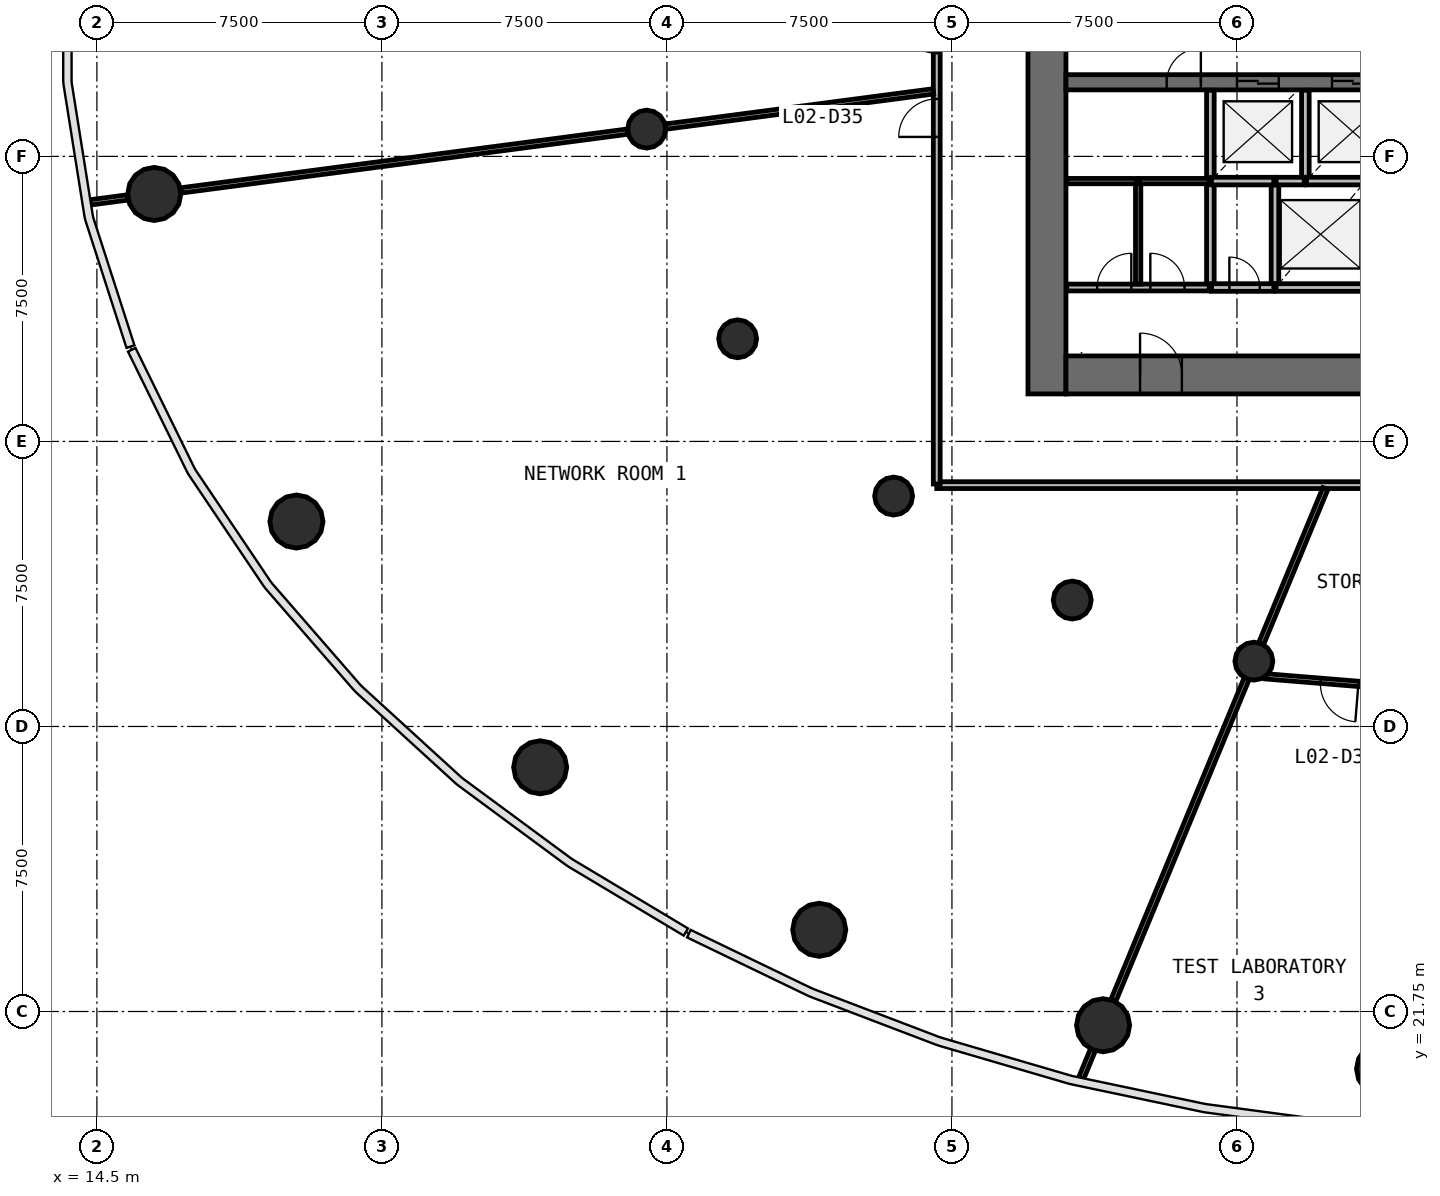
"""IFC4 building model, lengths in metres.
Left out: names, types, materials, properties, quantities, classifications, styles, units other than length and angle.
Written with IfcOpenShell. Run it as: python <this file> out.ifc"""

import sys

from ifc_helpers import new_model, si_unit, direction, frame, frame_2d, origin, origin_2d, place, context, subcontext, project, spatial, rectangle, circle, extrude, source, transform, mapped, element, fill, save


model = new_model("IFC4")
c1 = context("Model", 3, precision=1e-05, world=origin(), true_north=direction((0.0, 1.0)))
c2 = subcontext(c1, "Body", "Model", "MODEL_VIEW")
j1 = project(units=[si_unit("LENGTHUNIT", "METRE"), si_unit("PLANEANGLEUNIT", "RADIAN")], contexts=[c1])
p1 = place(None, origin())
s1 = spatial("IfcSite", under=j1, at=p1, CompositionType="ELEMENT")
p2 = place(p1, origin())
s2 = spatial("IfcBuilding", under=s1, at=p2, CompositionType="ELEMENT")
p3 = place(p2, frame((0.0, 0.0, 9.4)))
s3 = spatial("IfcBuildingStorey", under=s2, at=p3, CompositionType="ELEMENT", Elevation=9.4)
p4 = place(p3, frame((39.5, 58.0, 0.0), z_axis=(0.0, 0.0, 1.0), x_axis=(0.0, -1.0, 0.0)))
e1 = element("IfcWall", 1, at=p4, inside=s3, PredefinedType="SHEAR", context=c2, shape_type="SweptSolid", body=[
    extrude(rectangle(XDim=20.0, YDim=1.0, at=frame_2d((10.0, 0.0))), origin(), (0.0, 0.0, 1.0), 4.4),
])
p5 = place(p4, frame((9.1, 0.0, 0.0)))
e2 = element("IfcOpeningElement", 2, at=p5, cuts=e1, PredefinedType="OPENING", context=c2, shape_type="SweptSolid", body=[
    extrude(rectangle(XDim=1.8, YDim=2.1, at=frame_2d((0.9, 1.05))), frame((0.0, 0.51, 0.0), z_axis=(0.0, -1.0, 0.0), x_axis=(1.0, 0.0, 0.0)), (0.0, 0.0, 1.0), 1.02),
])
p6 = place(p3, frame((40.0, 38.5, 0.0), z_axis=(0.0, 0.0, 1.0), x_axis=(1.0, 0.0, 0.0)))
e3 = element("IfcWall", 3, at=p6, inside=s3, PredefinedType="SHEAR", context=c2, shape_type="SweptSolid", body=[
    extrude(rectangle(XDim=24.0, YDim=1.0, at=frame_2d((12.0, 0.0))), origin(), (0.0, 0.0, 1.0), 4.4),
])
p7 = place(p6, frame((21.45, 0.0, 0.0)))
e4 = element("IfcOpeningElement", 4, at=p7, cuts=e3, PredefinedType="OPENING", context=c2, shape_type="SweptSolid", body=[
    extrude(rectangle(XDim=1.1, YDim=2.1, at=frame_2d((0.55, 1.05))), frame((0.0, 0.51, 0.0), z_axis=(0.0, -1.0, 0.0), x_axis=(1.0, 0.0, 0.0)), (0.0, 0.0, 1.0), 1.02),
])
p8 = place(p6, frame((1.95, 0.0, 0.0)))
e5 = element("IfcOpeningElement", 5, at=p8, cuts=e3, PredefinedType="OPENING", context=c2, shape_type="SweptSolid", body=[
    extrude(rectangle(XDim=1.1, YDim=2.1, at=frame_2d((0.55, 1.05))), frame((0.0, 0.51, 0.0), z_axis=(0.0, -1.0, 0.0), x_axis=(1.0, 0.0, 0.0)), (0.0, 0.0, 1.0), 1.02),
])
p9 = place(p3, frame((40.0, 46.2, 0.0), z_axis=(0.0, 0.0, 1.0), x_axis=(1.0, 0.0, 0.0)))
e6 = element("IfcWall", 6, at=p9, inside=s3, PredefinedType="SHEAR", context=c2, shape_type="SweptSolid", body=[
    extrude(rectangle(XDim=24.0, YDim=0.4, at=frame_2d((12.0, 0.0))), origin(), (0.0, 0.0, 1.0), 4.4),
])
p10 = place(p9, frame((4.5, 0.0, 0.0)))
e7 = element("IfcOpeningElement", 7, at=p10, cuts=e6, PredefinedType="OPENING", context=c2, shape_type="SweptSolid", body=[
    extrude(rectangle(XDim=1.1, YDim=2.1, at=frame_2d((0.55, 1.05))), frame((0.0, 0.21, 0.0), z_axis=(0.0, -1.0, 0.0), x_axis=(1.0, 0.0, 0.0)), (0.0, 0.0, 1.0), 0.42),
])
p11 = place(p9, frame((7.0, 0.0, 0.0)))
e8 = element("IfcOpeningElement", 8, at=p11, cuts=e6, PredefinedType="OPENING", context=c2, shape_type="SweptSolid", body=[
    extrude(rectangle(XDim=1.1, YDim=2.1, at=frame_2d((0.55, 1.05))), frame((0.0, 0.21, 0.0), z_axis=(0.0, -1.0, 0.0), x_axis=(1.0, 0.0, 0.0)), (0.0, 0.0, 1.0), 0.42),
])
p12 = place(p9, frame((9.5, 0.0, 0.0)))
e9 = element("IfcOpeningElement", 9, at=p12, cuts=e6, PredefinedType="OPENING", context=c2, shape_type="SweptSolid", body=[
    extrude(rectangle(XDim=1.1, YDim=2.1, at=frame_2d((0.55, 1.05))), frame((0.0, 0.21, 0.0), z_axis=(0.0, -1.0, 0.0), x_axis=(1.0, 0.0, 0.0)), (0.0, 0.0, 1.0), 0.42),
])
p13 = place(p9, frame((20.45, 0.0, 0.0)))
e10 = element("IfcOpeningElement", 10, at=p13, cuts=e6, PredefinedType="OPENING", context=c2, shape_type="SweptSolid", body=[
    extrude(rectangle(XDim=0.9, YDim=2.1, at=frame_2d((0.45, 1.05))), frame((0.0, 0.21, 0.0), z_axis=(0.0, -1.0, 0.0), x_axis=(1.0, 0.0, 0.0)), (0.0, 0.0, 1.0), 0.42),
])
p14 = place(p9, frame((2.65, 0.0, 0.0)))
e11 = element("IfcOpeningElement", 11, at=p14, cuts=e6, PredefinedType="OPENING", context=c2, shape_type="SweptSolid", body=[
    extrude(rectangle(XDim=0.9, YDim=2.1, at=frame_2d((0.45, 1.05))), frame((0.0, 0.21, 0.0), z_axis=(0.0, -1.0, 0.0), x_axis=(1.0, 0.0, 0.0)), (0.0, 0.0, 1.0), 0.42),
])
p15 = place(p9, frame((11.65, 0.0, 0.0)))
e12 = element("IfcOpeningElement", 12, at=p15, cuts=e6, PredefinedType="OPENING", context=c2, shape_type="SweptSolid", body=[
    extrude(rectangle(XDim=0.9, YDim=2.1, at=frame_2d((0.45, 1.05))), frame((0.0, 0.21, 0.0), z_axis=(0.0, -1.0, 0.0), x_axis=(1.0, 0.0, 0.0)), (0.0, 0.0, 1.0), 0.42),
])
m1 = source(origin(), c2, "Body", "SweptSolid", [
    extrude(circle(Radius=0.7, at=origin_2d()), origin(), (0.0, 0.0, 1.0), 4.4),
])
for number, where, z_axis, x_axis in (
    (13, (16.01, 43.262, 0.0), (0.0, 0.0, 1.0), (1.0, 0.0, 0.0)),
    (14, (19.751, 34.642, 0.0), (0.0, 0.0, 1.0), (1.0, 0.0, 0.0)),
    (15, (26.164, 28.176, 0.0), (0.0, 0.0, 1.0), (1.0, 0.0, 0.0)),
    (16, (33.508, 23.9, 0.0), (0.0, 0.0, 1.0), (1.0, 0.0, 0.0)),
    (17, (40.977, 21.389, 0.0), (0.0, 0.0, 1.0), (1.0, 0.0, 0.0)),
    (18, (48.345, 20.239, 0.0), (0.0, 0.0, 1.0), (1.0, 0.0, 0.0)),
):
    element("IfcColumn", number, at=place(p3, frame(where, z_axis=z_axis, x_axis=x_axis)), inside=s3, PredefinedType="COLUMN", context=c2, shape_type="MappedRepresentation", body=[
        mapped(m1, transform((0.0, 0.0, 0.0), scale=1.0)),
    ])
m2 = source(origin(), c2, "Body", "SweptSolid", [
    extrude(circle(Radius=0.5, at=origin_2d()), origin(), (0.0, 0.0, 1.0), 4.4),
])
for number, where, z_axis, x_axis in (
    (19, (28.966, 44.968, 0.0), (0.0, 0.0, 1.0), (1.0, 0.0, 0.0)),
    (20, (31.361, 39.451, 0.0), (0.0, 0.0, 1.0), (1.0, 0.0, 0.0)),
    (21, (35.465, 35.312, 0.0), (0.0, 0.0, 1.0), (1.0, 0.0, 0.0)),
    (22, (40.165, 32.576, 0.0), (0.0, 0.0, 1.0), (1.0, 0.0, 0.0)),
    (23, (44.945, 30.969, 0.0), (0.0, 0.0, 1.0), (1.0, 0.0, 0.0)),
):
    element("IfcColumn", number, at=place(p3, frame(where, z_axis=z_axis, x_axis=x_axis)), inside=s3, PredefinedType="COLUMN", context=c2, shape_type="MappedRepresentation", body=[
        mapped(m2, transform((0.0, 0.0, 0.0), scale=1.0)),
    ])
for number, where, z_axis, x_axis in (
    (24, (43.8, 43.6, 0.0), (0.0, 0.0, 1.0), (0.0, -1.0, 0.0)),
    (25, (45.5, 43.6, 0.0), (0.0, 0.0, 1.0), (0.0, -1.0, 0.0)),
):
    element("IfcWall", number, at=place(p3, frame(where, z_axis=z_axis, x_axis=x_axis)), inside=s3, PredefinedType="SOLIDWALL", context=c2, shape_type="SweptSolid", body=[
        extrude(rectangle(XDim=2.8, YDim=0.2, at=frame_2d((1.4, 0.0))), origin(), (0.0, 0.0, 1.0), 3.95),
    ])
p16 = place(p3, frame((45.53, 40.8, 0.0), z_axis=(0.0, 0.0, 1.0), x_axis=(1.0, 0.0, 0.0)))
e26 = element("IfcWall", 26, at=p16, inside=s3, PredefinedType="SOLIDWALL", context=c2, shape_type="SweptSolid", body=[
    extrude(rectangle(XDim=2.34, YDim=0.2, at=frame_2d((1.17, 0.0))), origin(), (0.0, 0.0, 1.0), 3.95),
])
p17 = place(p3, frame((43.8, 45.99, 0.0), z_axis=(0.0, 0.0, 1.0), x_axis=(0.0, -1.0, 0.0)))
e27 = element("IfcWall", 27, at=p17, inside=s3, PredefinedType="SOLIDWALL", context=c2, shape_type="SweptSolid", body=[
    extrude(rectangle(XDim=2.36, YDim=0.2, at=frame_2d((1.18, 0.0))), origin(), (0.0, 0.0, 1.0), 3.95),
])
p18 = place(p3, frame((46.3, 43.6, 0.0), z_axis=(0.0, 0.0, 1.0), x_axis=(0.0, 1.0, 0.0)))
e28 = element("IfcWall", 28, at=p18, inside=s3, PredefinedType="SOLIDWALL", context=c2, shape_type="SweptSolid", body=[
    extrude(rectangle(XDim=2.39, YDim=0.2, at=frame_2d((1.195, 0.0))), origin(), (0.0, 0.0, 1.0), 3.95),
])
p19 = place(p3, frame((43.83, 43.6, 0.0), z_axis=(0.0, 0.0, 1.0), x_axis=(1.0, 0.0, 0.0)))
e29 = element("IfcWall", 29, at=p19, inside=s3, PredefinedType="SOLIDWALL", context=c2, shape_type="SweptSolid", body=[
    extrude(rectangle(XDim=1.64, YDim=0.2, at=frame_2d((0.82, 0.0))), origin(), (0.0, 0.0, 1.0), 3.95),
])
p20 = place(p3, frame((43.83, 40.8, 0.0), z_axis=(0.0, 0.0, 1.0), x_axis=(1.0, 0.0, 0.0)))
e30 = element("IfcWall", 30, at=p20, inside=s3, PredefinedType="SOLIDWALL", context=c2, shape_type="SweptSolid", body=[
    extrude(rectangle(XDim=1.64, YDim=0.2, at=frame_2d((0.82, 0.0))), origin(), (0.0, 0.0, 1.0), 3.95),
])
p21 = place(p20, frame((0.47, 0.0, 0.0)))
e31 = element("IfcOpeningElement", 31, at=p21, cuts=e30, PredefinedType="OPENING", context=c2, shape_type="SweptSolid", body=[
    extrude(rectangle(XDim=0.8, YDim=2.1, at=frame_2d((0.4, 1.05))), frame((0.0, 0.11, 0.0), z_axis=(0.0, -1.0, 0.0), x_axis=(1.0, 0.0, 0.0)), (0.0, 0.0, 1.0), 0.22),
])
p22 = place(p3, frame((46.33, 43.6, 0.0), z_axis=(0.0, 0.0, 1.0), x_axis=(1.0, 0.0, 0.0)))
e32 = element("IfcWall", 32, at=p22, inside=s3, PredefinedType="SOLIDWALL", context=c2, shape_type="SweptSolid", body=[
    extrude(rectangle(XDim=1.54, YDim=0.2, at=frame_2d((0.77, 0.0))), origin(), (0.0, 0.0, 1.0), 3.95),
])
p23 = place(p3, frame((45.53, 43.6, 0.0), z_axis=(0.0, 0.0, 1.0), x_axis=(1.0, 0.0, 0.0)))
e33 = element("IfcWall", 33, at=p23, inside=s3, PredefinedType="SOLIDWALL", context=c2, shape_type="SweptSolid", body=[
    extrude(rectangle(XDim=0.74, YDim=0.2, at=frame_2d((0.37, 0.0))), origin(), (0.0, 0.0, 1.0), 3.95),
])
p24 = place(p3, frame((67.4, 35.6, 0.0), z_axis=(0.0, 0.0, 1.0), x_axis=(-1.0, 0.0, 0.0)))
e34 = element("IfcWall", 34, at=p24, inside=s3, PredefinedType="PARTITIONING", context=c2, shape_type="SweptSolid", body=[
    extrude(rectangle(XDim=30.8, YDim=0.18, at=frame_2d((15.4, 0.0))), origin(), (0.0, 0.0, 1.0), 3.15),
])
p25 = place(p24, frame((14.95, 0.0, 0.0)))
e35 = element("IfcOpeningElement", 35, at=p25, cuts=e34, PredefinedType="OPENING", context=c2, shape_type="SweptSolid", body=[
    extrude(rectangle(XDim=1.0, YDim=2.1, at=frame_2d((0.5, 1.05))), frame((0.0, 0.1, 0.0), z_axis=(0.0, -1.0, 0.0), x_axis=(1.0, 0.0, 0.0)), (0.0, 0.0, 1.0), 0.2),
])
p26 = place(p24, frame((12.55, 0.0, 0.0)))
e36 = element("IfcOpeningElement", 36, at=p26, cuts=e34, PredefinedType="OPENING", context=c2, shape_type="SweptSolid", body=[
    extrude(rectangle(XDim=1.0, YDim=2.1, at=frame_2d((0.5, 1.05))), frame((0.0, 0.1, 0.0), z_axis=(0.0, -1.0, 0.0), x_axis=(1.0, 0.0, 0.0)), (0.0, 0.0, 1.0), 0.2),
])
p27 = place(p3, frame((36.6, 35.63, 0.0), z_axis=(0.0, 0.0, 1.0), x_axis=(0.0, 1.0, 0.0)))
e37 = element("IfcWall", 37, at=p27, inside=s3, PredefinedType="PARTITIONING", context=c2, shape_type="SweptSolid", body=[
    extrude(rectangle(XDim=23.583, YDim=0.18, at=frame_2d((11.791, 0.0))), origin(), (0.0, 0.0, 1.0), 3.15),
])
p28 = place(p27, frame((19.133, 0.0, 0.0)))
e38 = element("IfcOpeningElement", 38, at=p28, cuts=e37, PredefinedType="OPENING", context=c2, shape_type="SweptSolid", body=[
    extrude(rectangle(XDim=1.0, YDim=2.1, at=frame_2d((0.5, 1.05))), frame((0.0, 0.1, 0.0), z_axis=(0.0, -1.0, 0.0), x_axis=(1.0, 0.0, 0.0)), (0.0, 0.0, 1.0), 0.2),
])
p29 = place(p27, frame((11.333, 0.0, 0.0)))
e39 = element("IfcOpeningElement", 39, at=p29, cuts=e37, PredefinedType="OPENING", context=c2, shape_type="SweptSolid", body=[
    extrude(rectangle(XDim=1.0, YDim=2.1, at=frame_2d((0.5, 1.05))), frame((0.0, 0.1, 0.0), z_axis=(0.0, -1.0, 0.0), x_axis=(1.0, 0.0, 0.0)), (0.0, 0.0, 1.0), 0.2),
])
p30 = place(p27, frame((9.133, 0.0, 0.0)))
e40 = element("IfcOpeningElement", 40, at=p30, cuts=e37, PredefinedType="OPENING", context=c2, shape_type="SweptSolid", body=[
    extrude(rectangle(XDim=1.0, YDim=2.1, at=frame_2d((0.5, 1.05))), frame((0.0, 0.1, 0.0), z_axis=(0.0, -1.0, 0.0), x_axis=(1.0, 0.0, 0.0)), (0.0, 0.0, 1.0), 0.2),
])
p31 = place(p3, frame((40.02, 40.8, 0.0), z_axis=(0.0, 0.0, 1.0), x_axis=(1.0, 0.0, 0.0)))
e41 = element("IfcWall", 41, at=p31, inside=s3, PredefinedType="PARTITIONING", context=c2, shape_type="SweptSolid", body=[
    extrude(rectangle(XDim=3.75, YDim=0.18, at=frame_2d((1.875, 0.0))), origin(), (0.0, 0.0, 1.0), 3.95),
])
p32 = place(p31, frame((0.8, 0.0, 0.0)))
e42 = element("IfcOpeningElement", 42, at=p32, cuts=e41, PredefinedType="OPENING", context=c2, shape_type="SweptSolid", body=[
    extrude(rectangle(XDim=0.9, YDim=2.1, at=frame_2d((0.45, 1.05))), frame((0.0, 0.1, 0.0), z_axis=(0.0, -1.0, 0.0), x_axis=(1.0, 0.0, 0.0)), (0.0, 0.0, 1.0), 0.2),
])
p33 = place(p31, frame((2.2, 0.0, 0.0)))
e43 = element("IfcOpeningElement", 43, at=p33, cuts=e41, PredefinedType="OPENING", context=c2, shape_type="SweptSolid", body=[
    extrude(rectangle(XDim=0.9, YDim=2.1, at=frame_2d((0.45, 1.05))), frame((0.0, 0.1, 0.0), z_axis=(0.0, -1.0, 0.0), x_axis=(1.0, 0.0, 0.0)), (0.0, 0.0, 1.0), 0.2),
])
p34 = place(p3, frame((28.466, 44.902, 0.0), z_axis=(0.0, 0.0, 1.0), x_axis=(-0.991446586451, -0.130513088287, 0.0)))
e44 = element("IfcWall", 44, at=p34, inside=s3, PredefinedType="PARTITIONING", context=c2, shape_type="SweptSolid", body=[
    extrude(rectangle(XDim=11.86, YDim=0.14, at=frame_2d((5.93, 0.0))), origin(), (0.0, 0.0, 1.0), 3.15),
])
p35 = place(p3, frame((44.752, 30.502, 0.0), z_axis=(0.0, 0.0, 1.0), x_axis=(-0.382672728165, -0.923883966264, 0.0)))
e45 = element("IfcWall", 45, at=p35, inside=s3, PredefinedType="PARTITIONING", context=c2, shape_type="SweptSolid", body=[
    extrude(rectangle(XDim=9.16, YDim=0.14, at=frame_2d((4.58, 0.0))), origin(), (0.0, 0.0, 1.0), 3.15),
])
p36 = place(p3, frame((36.51, 45.961, 0.0), z_axis=(0.0, 0.0, 1.0), x_axis=(-0.99144622305, -0.130515848849, 0.0)))
e46 = element("IfcWall", 46, at=p36, inside=s3, PredefinedType="PARTITIONING", context=c2, shape_type="SweptSolid", body=[
    extrude(rectangle(XDim=7.104, YDim=0.14, at=frame_2d((3.552, 0.0))), origin(), (0.0, 0.0, 1.0), 3.15),
])
p37 = place(p3, frame((46.826, 35.51, 0.0), z_axis=(0.0, 0.0, 1.0), x_axis=(-0.382672831764, -0.923883923353, 0.0)))
e47 = element("IfcWall", 47, at=p37, inside=s3, PredefinedType="PARTITIONING", context=c2, shape_type="SweptSolid", body=[
    extrude(rectangle(XDim=4.41, YDim=0.14, at=frame_2d((2.205, 0.0))), origin(), (0.0, 0.0, 1.0), 3.15),
])
p38 = place(p3, frame((49.157, 30.252, 0.0), z_axis=(0.0, 0.0, 1.0), x_axis=(-0.996710154567, 0.081048552007, 0.0)))
e48 = element("IfcWall", 48, at=p38, inside=s3, PredefinedType="PARTITIONING", context=c2, shape_type="SweptSolid", body=[
    extrude(rectangle(XDim=3.916, YDim=0.14, at=frame_2d((1.958, 0.0))), origin(), (0.0, 0.0, 1.0), 3.15),
])
p39 = place(p38, frame((1.466, 0.0, 0.0)))
e49 = element("IfcOpeningElement", 49, at=p39, cuts=e48, PredefinedType="OPENING", context=c2, shape_type="SweptSolid", body=[
    extrude(rectangle(XDim=1.0, YDim=2.1, at=frame_2d((0.5, 1.05))), frame((0.0, 0.08, 0.0), z_axis=(0.0, -1.0, 0.0), x_axis=(1.0, 0.0, 0.0)), (0.0, 0.0, 1.0), 0.16),
])
p40 = place(p3, frame((41.9, 40.89, 0.0), z_axis=(0.0, 0.0, 1.0), x_axis=(0.0, 1.0, 0.0)))
e50 = element("IfcWall", 50, at=p40, inside=s3, PredefinedType="PARTITIONING", context=c2, shape_type="SweptSolid", body=[
    extrude(rectangle(XDim=2.71, YDim=0.14, at=frame_2d((1.355, 0.0))), origin(), (0.0, 0.0, 1.0), 3.15),
])
p41 = place(p3, frame((43.77, 43.6, 0.0), z_axis=(0.0, 0.0, 1.0), x_axis=(-1.0, 0.0, 0.0)))
e51 = element("IfcWall", 51, at=p41, inside=s3, PredefinedType="PARTITIONING", context=c2, shape_type="SweptSolid", body=[
    extrude(rectangle(XDim=1.84, YDim=0.14, at=frame_2d((0.92, 0.0))), origin(), (0.0, 0.0, 1.0), 3.15),
])
p42 = place(p3, frame((41.87, 43.6, 0.0), z_axis=(0.0, 0.0, 1.0), x_axis=(-1.0, 0.0, 0.0)))
e52 = element("IfcWall", 52, at=p42, inside=s3, PredefinedType="PARTITIONING", context=c2, shape_type="SweptSolid", body=[
    extrude(rectangle(XDim=1.85, YDim=0.14, at=frame_2d((0.925, 0.0))), origin(), (0.0, 0.0, 1.0), 3.15),
])
p43 = place(p3, frame((15.311, 43.17, 0.0), z_axis=(0.0, 0.0, 1.0), x_axis=(-0.991417173479, -0.130736330569, 0.0)))
e53 = element("IfcWall", 53, at=p43, inside=s3, PredefinedType="PARTITIONING", context=c2, shape_type="SweptSolid", body=[
    extrude(rectangle(XDim=1.008, YDim=0.14, at=frame_2d((0.504, 0.0))), origin(), (0.0, 0.0, 1.0), 3.15),
])
p44 = place(p3, frame((40.708, 20.737, 0.0), z_axis=(0.0, 0.0, 1.0), x_axis=(-0.382692107758, -0.923875938998, 0.0)))
e54 = element("IfcWall", 54, at=p44, inside=s3, PredefinedType="PARTITIONING", context=c2, shape_type="SweptSolid", body=[
    extrude(rectangle(XDim=0.802, YDim=0.14, at=frame_2d((0.401, 0.0))), origin(), (0.0, 0.0, 1.0), 3.15),
])
m3 = source(origin(), c2, "Body", "SweptSolid", [
    extrude(rectangle(XDim=1.1, YDim=2.1, at=frame_2d((0.55, 1.05))), frame((0.0, 0.025, 0.0), z_axis=(0.0, -1.0, 0.0), x_axis=(1.0, 0.0, 0.0)), (0.0, 0.0, 1.0), 0.05),
])
p45 = place(p10, origin())
e55 = element("IfcDoor", 55, at=p45, inside=s3, OperationType="DOUBLE_DOOR_SLIDING", PredefinedType="USERDEFINED", context=c2, shape_type="MappedRepresentation", body=[
    mapped(m3, transform((0.0, 0.0, 0.0), scale=1.0)),
])
fill(e7, e55)
p46 = place(p11, origin())
e56 = element("IfcDoor", 56, at=p46, inside=s3, OperationType="DOUBLE_DOOR_SLIDING", PredefinedType="USERDEFINED", context=c2, shape_type="MappedRepresentation", body=[
    mapped(m3, transform((0.0, 0.0, 0.0), scale=1.0)),
])
fill(e8, e56)
m4 = source(origin(), c2, "Body", "SweptSolid", [
    extrude(rectangle(XDim=0.8, YDim=2.1, at=frame_2d((0.4, 1.05))), frame((0.0, 0.025, 0.0), z_axis=(0.0, -1.0, 0.0), x_axis=(1.0, 0.0, 0.0)), (0.0, 0.0, 1.0), 0.05),
])
p47 = place(p21, origin())
e57 = element("IfcDoor", 57, at=p47, inside=s3, OperationType="SINGLE_SWING_LEFT", PredefinedType="DOOR", context=c2, shape_type="MappedRepresentation", body=[
    mapped(m4, transform((0.0, 0.0, 0.0), scale=1.0)),
])
fill(e31, e57)
m5 = source(origin(), c2, "Body", "SweptSolid", [
    extrude(rectangle(XDim=1.1, YDim=2.1, at=frame_2d((0.55, 1.05))), frame((0.0, 0.025, 0.0), z_axis=(0.0, -1.0, 0.0), x_axis=(1.0, 0.0, 0.0)), (0.0, 0.0, 1.0), 0.05),
])
p48 = place(p8, origin())
e58 = element("IfcDoor", 58, at=p48, inside=s3, OperationType="SINGLE_SWING_LEFT", PredefinedType="DOOR", context=c2, shape_type="MappedRepresentation", body=[
    mapped(m5, transform((0.0, 0.0, 0.0), scale=1.0)),
])
fill(e5, e58)
m6 = source(origin(), c2, "Body", "SweptSolid", [
    extrude(rectangle(XDim=1.0, YDim=2.1, at=frame_2d((0.5, 1.05))), frame((0.0, 0.025, 0.0), z_axis=(0.0, -1.0, 0.0), x_axis=(1.0, 0.0, 0.0)), (0.0, 0.0, 1.0), 0.05),
])
p49 = place(p29, origin())
e59 = element("IfcDoor", 59, at=p49, inside=s3, OperationType="SINGLE_SWING_RIGHT", PredefinedType="DOOR", context=c2, shape_type="MappedRepresentation", body=[
    mapped(m6, transform((0.0, 0.0, 0.0), scale=1.0)),
])
fill(e39, e59)
p50 = place(p30, origin())
e60 = element("IfcDoor", 60, at=p50, inside=s3, OperationType="SINGLE_SWING_LEFT", PredefinedType="DOOR", context=c2, shape_type="MappedRepresentation", body=[
    mapped(m6, transform((0.0, 0.0, 0.0), scale=1.0)),
])
fill(e40, e60)
p51 = place(p39, origin())
e61 = element("IfcDoor", 61, at=p51, inside=s3, OperationType="SINGLE_SWING_LEFT", PredefinedType="DOOR", context=c2, shape_type="MappedRepresentation", body=[
    mapped(m6, transform((0.0, 0.0, 0.0), scale=1.0)),
])
fill(e49, e61)
m7 = source(origin(), c2, "Body", "SweptSolid", [
    extrude(rectangle(XDim=0.9, YDim=2.1, at=frame_2d((0.45, 1.05))), frame((0.0, 0.025, 0.0), z_axis=(0.0, -1.0, 0.0), x_axis=(1.0, 0.0, 0.0)), (0.0, 0.0, 1.0), 0.05),
])
p52 = place(p32, origin())
e62 = element("IfcDoor", 62, at=p52, inside=s3, OperationType="SINGLE_SWING_RIGHT", PredefinedType="DOOR", context=c2, shape_type="MappedRepresentation", body=[
    mapped(m7, transform((0.0, 0.0, 0.0), scale=1.0)),
])
fill(e42, e62)
p53 = place(p33, origin())
e63 = element("IfcDoor", 63, at=p53, inside=s3, OperationType="SINGLE_SWING_LEFT", PredefinedType="DOOR", context=c2, shape_type="MappedRepresentation", body=[
    mapped(m7, transform((0.0, 0.0, 0.0), scale=1.0)),
])
fill(e43, e63)
p54 = place(p14, origin())
e64 = element("IfcDoor", 64, at=p54, inside=s3, OperationType="SINGLE_SWING_RIGHT", PredefinedType="DOOR", context=c2, shape_type="MappedRepresentation", body=[
    mapped(m7, transform((0.0, 0.0, 0.0), scale=1.0)),
])
fill(e11, e64)
save(model, sys.argv[1])
